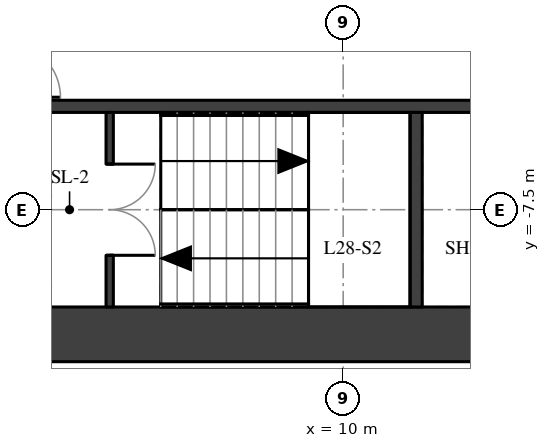
"""IFC4 building model, lengths in metres.
Left out: names, types, materials, properties, quantities, classifications, styles, units other than length and angle.
Written with IfcOpenShell. Run it as: python <this file> out.ifc"""

import sys

from ifc_helpers import new_model, si_unit, direction, frame, frame_2d, origin, place, context, subcontext, project, spatial, rectangle, extrude, element, fill, save


model = new_model("IFC4")
c1 = context("Model", 3, precision=1e-05, world=origin(), true_north=direction((0.0, 1.0)))
c2 = subcontext(c1, "Body", "Model", "MODEL_VIEW")
j1 = project(units=[si_unit("LENGTHUNIT", "METRE"), si_unit("PLANEANGLEUNIT", "RADIAN")], contexts=[c1])
p1 = place(None, origin())
s1 = spatial("IfcSite", under=j1, at=p1, CompositionType="ELEMENT")
p2 = place(p1, origin())
s2 = spatial("IfcBuilding", under=s1, at=p2, CompositionType="ELEMENT")
p3 = place(p2, frame((0.0, 0.0, 102.1)))
s3 = spatial("IfcBuildingStorey", under=s2, at=p3, CompositionType="ELEMENT", Elevation=102.1)
p4 = place(p3, frame((4.9, -9.55, 0.0), z_axis=(0.0, 0.0, 1.0), x_axis=(1.0, 0.0, 0.0)))
e1 = element("IfcWall", 1, at=p4, inside=s3, PredefinedType="SHEAR", context=c2, shape_type="SweptSolid", body=[
    extrude(rectangle(XDim=10.2, YDim=0.9, at=frame_2d((5.1, 0.0))), origin(), (0.0, 0.0, 1.0), 3.02),
])
p5 = place(p3, frame((4.9, -5.8, 0.0), z_axis=(0.0, 0.0, 1.0), x_axis=(1.0, 0.0, 0.0)))
e2 = element("IfcWall", 2, at=p5, inside=s3, PredefinedType="SHEAR", context=c2, shape_type="SweptSolid", body=[
    extrude(rectangle(XDim=10.2, YDim=0.2, at=frame_2d((5.1, 0.0))), origin(), (0.0, 0.0, 1.0), 3.02),
])
p6 = place(p3, frame((11.2, -9.1, 0.0), z_axis=(0.0, 0.0, 1.0), x_axis=(0.0, 1.0, 0.0)))
e3 = element("IfcWall", 3, at=p6, inside=s3, PredefinedType="SHEAR", context=c2, shape_type="SweptSolid", body=[
    extrude(rectangle(XDim=3.2, YDim=0.2, at=frame_2d((1.6, 0.0))), origin(), (0.0, 0.0, 1.0), 3.02),
])
p7 = place(p3, frame((6.16, -9.1, 0.0), z_axis=(0.0, 0.0, 1.0), x_axis=(0.0, 1.0, 0.0)))
e4 = element("IfcWall", 4, at=p7, inside=s3, PredefinedType="SHEAR", context=c2, shape_type="SweptSolid", body=[
    extrude(rectangle(XDim=3.2, YDim=0.12, at=frame_2d((1.6, 0.0))), origin(), (0.0, 0.0, 1.0), 3.02),
])
p8 = place(p7, frame((0.85, 0.0, 0.0)))
e5 = element("IfcOpeningElement", 5, at=p8, cuts=e4, PredefinedType="OPENING", context=c2, shape_type="SweptSolid", body=[
    extrude(rectangle(XDim=1.5, YDim=2.1, at=frame_2d((0.75, 1.05))), frame((0.0, 0.07, 0.0), z_axis=(0.0, -1.0, 0.0), x_axis=(1.0, 0.0, 0.0)), (0.0, 0.0, 1.0), 0.14),
])
p9 = place(p8, origin())
e6 = element("IfcDoor", 6, at=p9, inside=s3, OperationType="DOUBLE_DOOR_SINGLE_SWING", PredefinedType="DOOR", context=c2, shape_type="SweptSolid", body=[
    extrude(rectangle(XDim=1.5, YDim=2.1, at=frame_2d((0.75, 1.05))), frame((0.0, 0.025, 0.0), z_axis=(0.0, -1.0, 0.0), x_axis=(1.0, 0.0, 0.0)), (0.0, 0.0, 1.0), 0.05),
])
fill(e5, e6)
save(model, sys.argv[1])
